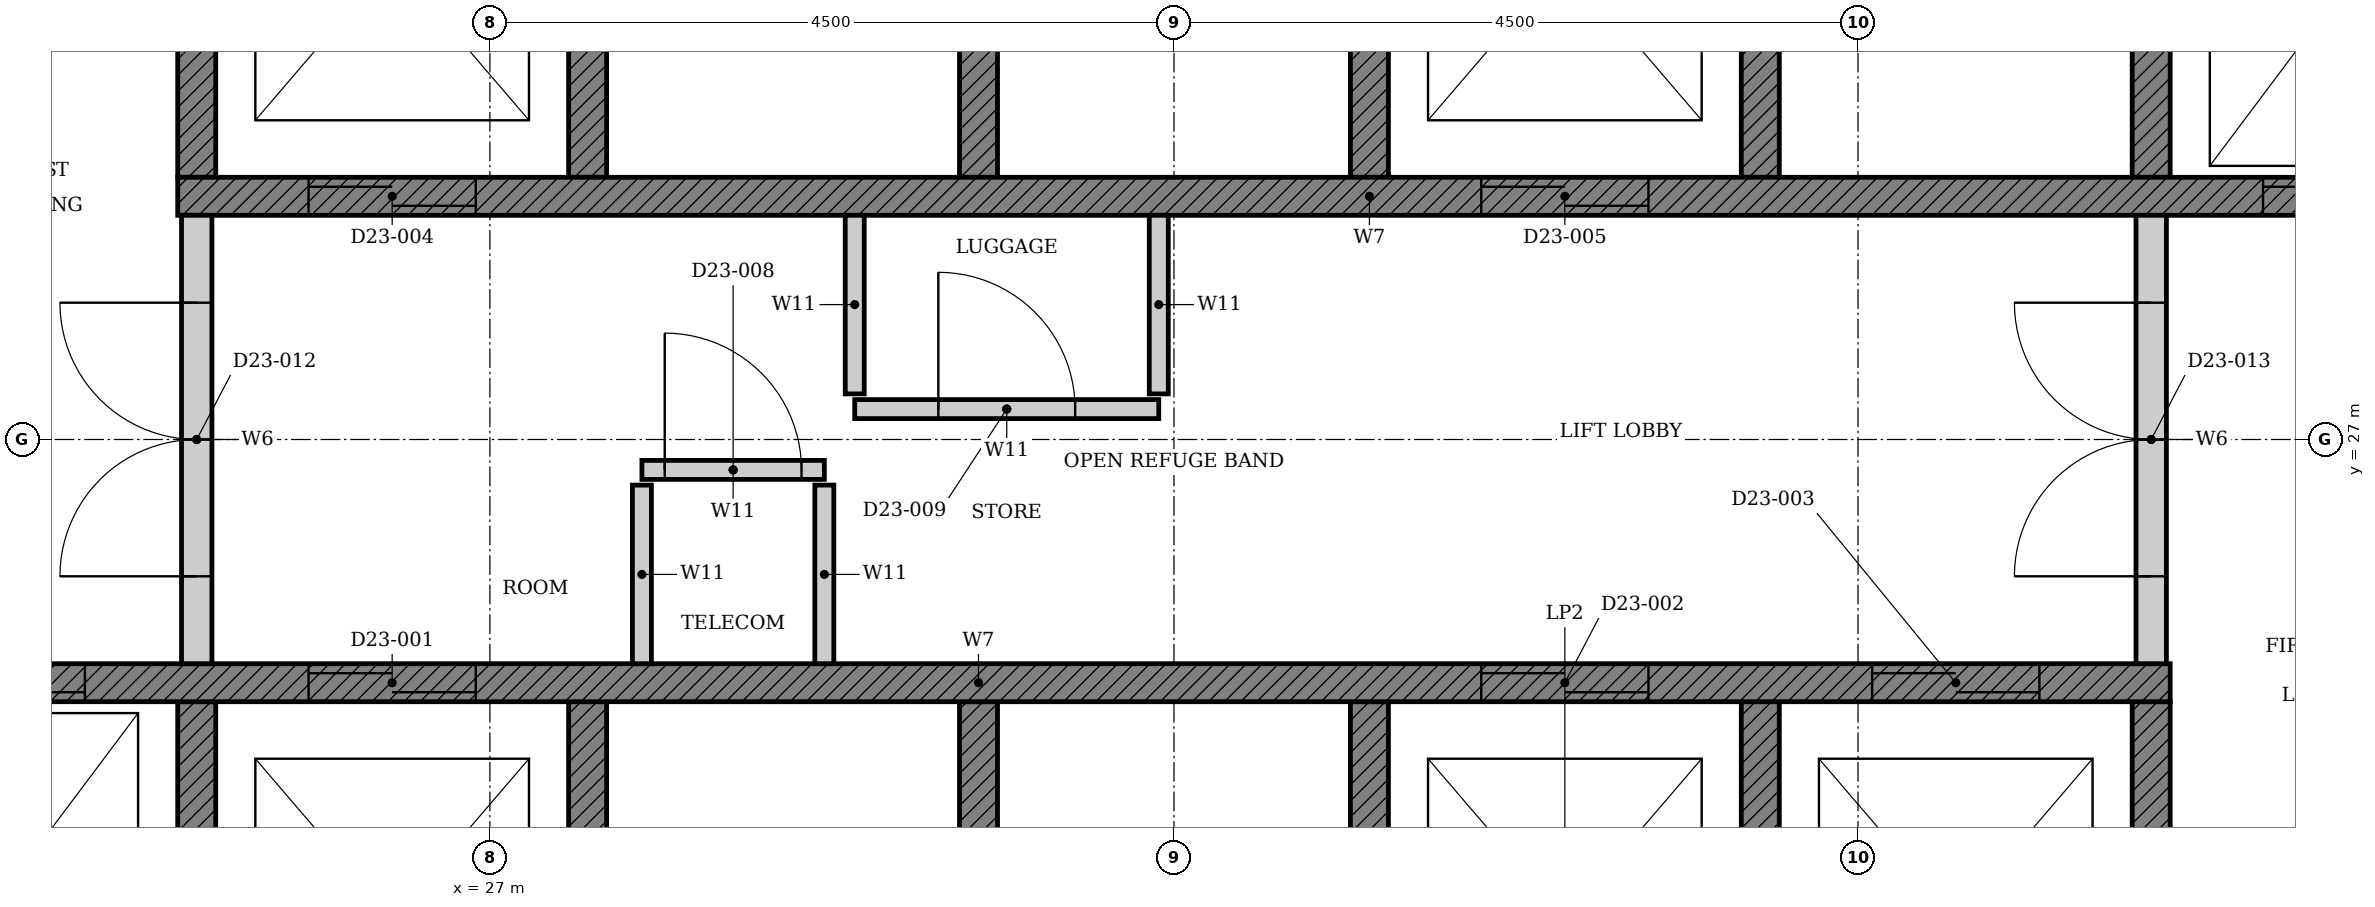
"""IFC4 building model, lengths in metres.
Left out: names, types, materials, properties, quantities, classifications, styles, units other than length and angle.
Written with IfcOpenShell. Run it as: python <this file> out.ifc"""

import sys

from ifc_helpers import new_model, si_unit, direction, frame, frame_2d, origin, place, context, subcontext, project, spatial, polyline, rectangle, outline, extrude, element, fill, save


model = new_model("IFC4")
c1 = context("Model", 3, precision=1e-05, world=origin(), true_north=direction((0.0, 1.0)))
c2 = subcontext(c1, "Body", "Model", "MODEL_VIEW")
j1 = project(units=[si_unit("LENGTHUNIT", "METRE"), si_unit("PLANEANGLEUNIT", "RADIAN")], contexts=[c1])
p1 = place(None, origin())
s1 = spatial("IfcSite", under=j1, at=p1, CompositionType="ELEMENT")
p2 = place(p1, origin())
s2 = spatial("IfcBuilding", under=s1, at=p2, CompositionType="ELEMENT")
p3 = place(p2, frame((0.0, 0.0, 96.0)))
s3 = spatial("IfcBuildingStorey", under=s2, at=p3, CompositionType="ELEMENT", Elevation=96.0)
p4 = place(p3, origin())
e1 = element("IfcWall", 1, at=p4, inside=s3, PredefinedType="SHEAR", context=c2, shape_type="SweptSolid", body=[
    extrude(outline(polyline([(22.375, 22.35), (38.053, 22.35), (38.053, 25.275), (37.803, 25.275), (37.803, 22.65), (35.482, 22.65), (35.482, 25.275), (35.232, 25.275), (35.232, 22.65), (32.911, 22.65), (32.911, 25.275), (32.661, 25.275), (32.661, 22.65), (30.339, 22.65), (30.339, 25.275), (30.089, 25.275), (30.089, 22.65), (27.768, 22.65), (27.768, 25.275), (27.518, 25.275), (27.518, 22.65), (25.197, 22.65), (25.197, 25.275), (24.947, 25.275), (24.947, 22.65), (22.625, 22.65), (22.625, 25.275), (22.375, 25.275), (22.375, 22.35)])), origin(), (0.0, 0.0, 1.0), 4.5),
])
p5 = place(p3, origin())
e2 = element("IfcWall", 2, at=p5, inside=s3, PredefinedType="SHEAR", context=c2, shape_type="SweptSolid", body=[
    extrude(outline(polyline([(24.947, 28.725), (25.197, 28.725), (25.197, 31.35), (27.518, 31.35), (27.518, 28.725), (27.768, 28.725), (27.768, 31.35), (30.089, 31.35), (30.089, 28.725), (30.339, 28.725), (30.339, 31.35), (32.661, 31.35), (32.661, 28.725), (32.911, 28.725), (32.911, 31.35), (35.232, 31.35), (35.232, 28.725), (35.482, 28.725), (35.482, 31.35), (37.803, 31.35), (37.803, 28.725), (38.053, 28.725), (38.053, 31.35), (40.375, 31.35), (40.375, 28.725), (40.625, 28.725), (40.625, 31.65), (24.947, 31.65), (24.947, 28.725)])), origin(), (0.0, 0.0, 1.0), 4.5),
])
p6 = place(p3, frame((22.375, 25.4, 0.0), z_axis=(0.0, 0.0, 1.0), x_axis=(1.0, 0.0, 0.0)))
e3 = element("IfcWall", 3, at=p6, inside=s3, PredefinedType="SHEAR", context=c2, shape_type="SweptSolid", body=[
    extrude(rectangle(XDim=15.678, YDim=0.25, at=frame_2d((7.839, 0.0))), origin(), (0.0, 0.0, 1.0), 4.5),
])
p7 = place(p6, frame((3.432, 0.0, 0.0)))
e4 = element("IfcOpeningElement", 4, at=p7, cuts=e3, PredefinedType="OPENING", context=c2, shape_type="SweptSolid", body=[
    extrude(rectangle(XDim=1.1, YDim=2.1, at=frame_2d((0.55, 1.05))), frame((0.0, 0.135, 0.0), z_axis=(0.0, -1.0, 0.0), x_axis=(1.0, 0.0, 0.0)), (0.0, 0.0, 1.0), 0.27),
])
p8 = place(p6, frame((11.146, 0.0, 0.0)))
e5 = element("IfcOpeningElement", 5, at=p8, cuts=e3, PredefinedType="OPENING", context=c2, shape_type="SweptSolid", body=[
    extrude(rectangle(XDim=1.1, YDim=2.1, at=frame_2d((0.55, 1.05))), frame((0.0, 0.135, 0.0), z_axis=(0.0, -1.0, 0.0), x_axis=(1.0, 0.0, 0.0)), (0.0, 0.0, 1.0), 0.27),
])
p9 = place(p6, frame((13.718, 0.0, 0.0)))
e6 = element("IfcOpeningElement", 6, at=p9, cuts=e3, PredefinedType="OPENING", context=c2, shape_type="SweptSolid", body=[
    extrude(rectangle(XDim=1.1, YDim=2.1, at=frame_2d((0.55, 1.05))), frame((0.0, 0.135, 0.0), z_axis=(0.0, -1.0, 0.0), x_axis=(1.0, 0.0, 0.0)), (0.0, 0.0, 1.0), 0.27),
])
p10 = place(p6, frame((0.861, 0.0, 0.0)))
e7 = element("IfcOpeningElement", 7, at=p10, cuts=e3, PredefinedType="OPENING", context=c2, shape_type="SweptSolid", body=[
    extrude(rectangle(XDim=1.1, YDim=2.1, at=frame_2d((0.55, 1.05))), frame((0.0, 0.135, 0.0), z_axis=(0.0, -1.0, 0.0), x_axis=(1.0, 0.0, 0.0)), (0.0, 0.0, 1.0), 0.27),
])
p11 = place(p3, frame((24.947, 28.6, 0.0), z_axis=(0.0, 0.0, 1.0), x_axis=(1.0, 0.0, 0.0)))
e8 = element("IfcWall", 8, at=p11, inside=s3, PredefinedType="SHEAR", context=c2, shape_type="SweptSolid", body=[
    extrude(rectangle(XDim=15.678, YDim=0.25, at=frame_2d((7.839, 0.0))), origin(), (0.0, 0.0, 1.0), 4.5),
])
p12 = place(p11, frame((0.861, 0.0, 0.0)))
e9 = element("IfcOpeningElement", 9, at=p12, cuts=e8, PredefinedType="OPENING", context=c2, shape_type="SweptSolid", body=[
    extrude(rectangle(XDim=1.1, YDim=2.1, at=frame_2d((0.55, 1.05))), frame((0.0, 0.135, 0.0), z_axis=(0.0, -1.0, 0.0), x_axis=(1.0, 0.0, 0.0)), (0.0, 0.0, 1.0), 0.27),
])
p13 = place(p11, frame((8.575, 0.0, 0.0)))
e10 = element("IfcOpeningElement", 10, at=p13, cuts=e8, PredefinedType="OPENING", context=c2, shape_type="SweptSolid", body=[
    extrude(rectangle(XDim=1.1, YDim=2.1, at=frame_2d((0.55, 1.05))), frame((0.0, 0.135, 0.0), z_axis=(0.0, -1.0, 0.0), x_axis=(1.0, 0.0, 0.0)), (0.0, 0.0, 1.0), 0.27),
])
p14 = place(p11, frame((13.718, 0.0, 0.0)))
e11 = element("IfcOpeningElement", 11, at=p14, cuts=e8, PredefinedType="OPENING", context=c2, shape_type="SweptSolid", body=[
    extrude(rectangle(XDim=1.1, YDim=2.1, at=frame_2d((0.55, 1.05))), frame((0.0, 0.135, 0.0), z_axis=(0.0, -1.0, 0.0), x_axis=(1.0, 0.0, 0.0)), (0.0, 0.0, 1.0), 0.27),
])
p15 = place(p3, frame((28.0, 26.8, 0.0), z_axis=(0.0, 0.0, 1.0), x_axis=(1.0, 0.0, 0.0)))
e12 = element("IfcWall", 12, at=p15, inside=s3, PredefinedType="PARTITIONING", context=c2, shape_type="SweptSolid", body=[
    extrude(rectangle(XDim=1.2, YDim=0.125, at=frame_2d((0.6, 0.0))), origin(), (0.0, 0.0, 1.0), 4.5),
])
p16 = place(p15, frame((0.15, 0.0, 0.0)))
e13 = element("IfcOpeningElement", 13, at=p16, cuts=e12, PredefinedType="OPENING", context=c2, shape_type="SweptSolid", body=[
    extrude(rectangle(XDim=0.9, YDim=2.1, at=frame_2d((0.45, 1.05))), frame((0.0, 0.073, 0.0), z_axis=(0.0, -1.0, 0.0), x_axis=(1.0, 0.0, 0.0)), (0.0, 0.0, 1.0), 0.145),
])
for number, where, z_axis, x_axis in (
    (14, (28.0, 25.525, 0.0), (0.0, 0.0, 1.0), (0.0, 1.0, 0.0)),
    (15, (29.2, 25.525, 0.0), (0.0, 0.0, 1.0), (0.0, 1.0, 0.0)),
):
    element("IfcWall", number, at=place(p3, frame(where, z_axis=z_axis, x_axis=x_axis)), inside=s3, PredefinedType="PARTITIONING", context=c2, shape_type="SweptSolid", body=[
        extrude(rectangle(XDim=1.175, YDim=0.125, at=frame_2d((0.587, 0.0))), origin(), (0.0, 0.0, 1.0), 4.5),
    ])
p17 = place(p3, frame((29.4, 27.2, 0.0), z_axis=(0.0, 0.0, 1.0), x_axis=(1.0, 0.0, 0.0)))
e16 = element("IfcWall", 16, at=p17, inside=s3, PredefinedType="PARTITIONING", context=c2, shape_type="SweptSolid", body=[
    extrude(rectangle(XDim=2.0, YDim=0.125, at=frame_2d((1.0, 0.0))), origin(), (0.0, 0.0, 1.0), 4.5),
])
p18 = place(p17, frame((0.55, 0.0, 0.0)))
e17 = element("IfcOpeningElement", 17, at=p18, cuts=e16, PredefinedType="OPENING", context=c2, shape_type="SweptSolid", body=[
    extrude(rectangle(XDim=0.9, YDim=2.1, at=frame_2d((0.45, 1.05))), frame((0.0, 0.073, 0.0), z_axis=(0.0, -1.0, 0.0), x_axis=(1.0, 0.0, 0.0)), (0.0, 0.0, 1.0), 0.145),
])
for number, where, z_axis, x_axis in (
    (18, (29.4, 28.475, 0.0), (0.0, 0.0, 1.0), (0.0, -1.0, 0.0)),
    (19, (31.4, 28.475, 0.0), (0.0, 0.0, 1.0), (0.0, -1.0, 0.0)),
):
    element("IfcWall", number, at=place(p3, frame(where, z_axis=z_axis, x_axis=x_axis)), inside=s3, PredefinedType="PARTITIONING", context=c2, shape_type="SweptSolid", body=[
        extrude(rectangle(XDim=1.175, YDim=0.125, at=frame_2d((0.587, 0.0))), origin(), (0.0, 0.0, 1.0), 4.5),
    ])
p19 = place(p3, frame((25.072, 25.525, 0.0), z_axis=(0.0, 0.0, 1.0), x_axis=(0.0, 1.0, 0.0)))
e20 = element("IfcWall", 20, at=p19, inside=s3, PredefinedType="PARTITIONING", context=c2, shape_type="SweptSolid", body=[
    extrude(rectangle(XDim=2.95, YDim=0.2, at=frame_2d((1.475, 0.0))), origin(), (0.0, 0.0, 1.0), 4.5),
])
p20 = place(p19, frame((0.575, 0.0, 0.0)))
e21 = element("IfcOpeningElement", 21, at=p20, cuts=e20, PredefinedType="OPENING", context=c2, shape_type="SweptSolid", body=[
    extrude(rectangle(XDim=1.8, YDim=2.1, at=frame_2d((0.9, 1.05))), frame((0.0, 0.11, 0.0), z_axis=(0.0, -1.0, 0.0), x_axis=(1.0, 0.0, 0.0)), (0.0, 0.0, 1.0), 0.22),
])
p21 = place(p3, frame((37.928, 25.525, 0.0), z_axis=(0.0, 0.0, 1.0), x_axis=(0.0, 1.0, 0.0)))
e22 = element("IfcWall", 22, at=p21, inside=s3, PredefinedType="PARTITIONING", context=c2, shape_type="SweptSolid", body=[
    extrude(rectangle(XDim=2.95, YDim=0.2, at=frame_2d((1.475, 0.0))), origin(), (0.0, 0.0, 1.0), 4.5),
])
p22 = place(p21, frame((0.575, 0.0, 0.0)))
e23 = element("IfcOpeningElement", 23, at=p22, cuts=e22, PredefinedType="OPENING", context=c2, shape_type="SweptSolid", body=[
    extrude(rectangle(XDim=1.8, YDim=2.1, at=frame_2d((0.9, 1.05))), frame((0.0, 0.11, 0.0), z_axis=(0.0, -1.0, 0.0), x_axis=(1.0, 0.0, 0.0)), (0.0, 0.0, 1.0), 0.22),
])
p23 = place(p7, origin())
e24 = element("IfcDoor", 24, at=p23, inside=s3, OperationType="DOUBLE_DOOR_SLIDING", PredefinedType="DOOR", context=c2, shape_type="SweptSolid", body=[
    extrude(rectangle(XDim=1.1, YDim=2.1, at=frame_2d((0.55, 1.05))), frame((0.0, 0.025, 0.0), z_axis=(0.0, -1.0, 0.0), x_axis=(1.0, 0.0, 0.0)), (0.0, 0.0, 1.0), 0.05),
])
fill(e4, e24)
p24 = place(p8, origin())
e25 = element("IfcDoor", 25, at=p24, inside=s3, OperationType="DOUBLE_DOOR_SLIDING", PredefinedType="DOOR", context=c2, shape_type="SweptSolid", body=[
    extrude(rectangle(XDim=1.1, YDim=2.1, at=frame_2d((0.55, 1.05))), frame((0.0, 0.025, 0.0), z_axis=(0.0, -1.0, 0.0), x_axis=(1.0, 0.0, 0.0)), (0.0, 0.0, 1.0), 0.05),
])
fill(e5, e25)
p25 = place(p9, origin())
e26 = element("IfcDoor", 26, at=p25, inside=s3, OperationType="DOUBLE_DOOR_SLIDING", PredefinedType="DOOR", context=c2, shape_type="SweptSolid", body=[
    extrude(rectangle(XDim=1.1, YDim=2.1, at=frame_2d((0.55, 1.05))), frame((0.0, 0.025, 0.0), z_axis=(0.0, -1.0, 0.0), x_axis=(1.0, 0.0, 0.0)), (0.0, 0.0, 1.0), 0.05),
])
fill(e6, e26)
p26 = place(p12, origin())
e27 = element("IfcDoor", 27, at=p26, inside=s3, OperationType="DOUBLE_DOOR_SLIDING", PredefinedType="DOOR", context=c2, shape_type="SweptSolid", body=[
    extrude(rectangle(XDim=1.1, YDim=2.1, at=frame_2d((0.55, 1.05))), frame((0.0, 0.025, 0.0), z_axis=(0.0, -1.0, 0.0), x_axis=(1.0, 0.0, 0.0)), (0.0, 0.0, 1.0), 0.05),
])
fill(e9, e27)
p27 = place(p13, origin())
e28 = element("IfcDoor", 28, at=p27, inside=s3, OperationType="DOUBLE_DOOR_SLIDING", PredefinedType="DOOR", context=c2, shape_type="SweptSolid", body=[
    extrude(rectangle(XDim=1.1, YDim=2.1, at=frame_2d((0.55, 1.05))), frame((0.0, 0.025, 0.0), z_axis=(0.0, -1.0, 0.0), x_axis=(1.0, 0.0, 0.0)), (0.0, 0.0, 1.0), 0.05),
])
fill(e10, e28)
p28 = place(p10, origin())
e29 = element("IfcDoor", 29, at=p28, inside=s3, OperationType="DOUBLE_DOOR_SLIDING", PredefinedType="DOOR", context=c2, shape_type="SweptSolid", body=[
    extrude(rectangle(XDim=1.1, YDim=2.1, at=frame_2d((0.55, 1.05))), frame((0.0, 0.025, 0.0), z_axis=(0.0, -1.0, 0.0), x_axis=(1.0, 0.0, 0.0)), (0.0, 0.0, 1.0), 0.05),
])
fill(e7, e29)
p29 = place(p14, origin())
e30 = element("IfcDoor", 30, at=p29, inside=s3, OperationType="DOUBLE_DOOR_SLIDING", PredefinedType="DOOR", context=c2, shape_type="SweptSolid", body=[
    extrude(rectangle(XDim=1.1, YDim=2.1, at=frame_2d((0.55, 1.05))), frame((0.0, 0.025, 0.0), z_axis=(0.0, -1.0, 0.0), x_axis=(1.0, 0.0, 0.0)), (0.0, 0.0, 1.0), 0.05),
])
fill(e11, e30)
p30 = place(p16, origin())
e31 = element("IfcDoor", 31, at=p30, inside=s3, OperationType="SINGLE_SWING_LEFT", PredefinedType="DOOR", context=c2, shape_type="SweptSolid", body=[
    extrude(rectangle(XDim=0.9, YDim=2.1, at=frame_2d((0.45, 1.05))), frame((0.0, 0.025, 0.0), z_axis=(0.0, -1.0, 0.0), x_axis=(1.0, 0.0, 0.0)), (0.0, 0.0, 1.0), 0.05),
])
fill(e13, e31)
p31 = place(p18, origin())
e32 = element("IfcDoor", 32, at=p31, inside=s3, OperationType="SINGLE_SWING_LEFT", PredefinedType="DOOR", context=c2, shape_type="SweptSolid", body=[
    extrude(rectangle(XDim=0.9, YDim=2.1, at=frame_2d((0.45, 1.05))), frame((0.0, 0.025, 0.0), z_axis=(0.0, -1.0, 0.0), x_axis=(1.0, 0.0, 0.0)), (0.0, 0.0, 1.0), 0.05),
])
fill(e17, e32)
p32 = place(p20, origin())
e33 = element("IfcDoor", 33, at=p32, inside=s3, OperationType="DOUBLE_DOOR_SINGLE_SWING", PredefinedType="DOOR", context=c2, shape_type="SweptSolid", body=[
    extrude(rectangle(XDim=1.8, YDim=2.1, at=frame_2d((0.9, 1.05))), frame((0.0, 0.025, 0.0), z_axis=(0.0, -1.0, 0.0), x_axis=(1.0, 0.0, 0.0)), (0.0, 0.0, 1.0), 0.05),
])
fill(e21, e33)
p33 = place(p22, origin())
e34 = element("IfcDoor", 34, at=p33, inside=s3, OperationType="DOUBLE_DOOR_SINGLE_SWING", PredefinedType="DOOR", context=c2, shape_type="SweptSolid", body=[
    extrude(rectangle(XDim=1.8, YDim=2.1, at=frame_2d((0.9, 1.05))), frame((0.0, 0.025, 0.0), z_axis=(0.0, -1.0, 0.0), x_axis=(1.0, 0.0, 0.0)), (0.0, 0.0, 1.0), 0.05),
])
fill(e23, e34)
save(model, sys.argv[1])
